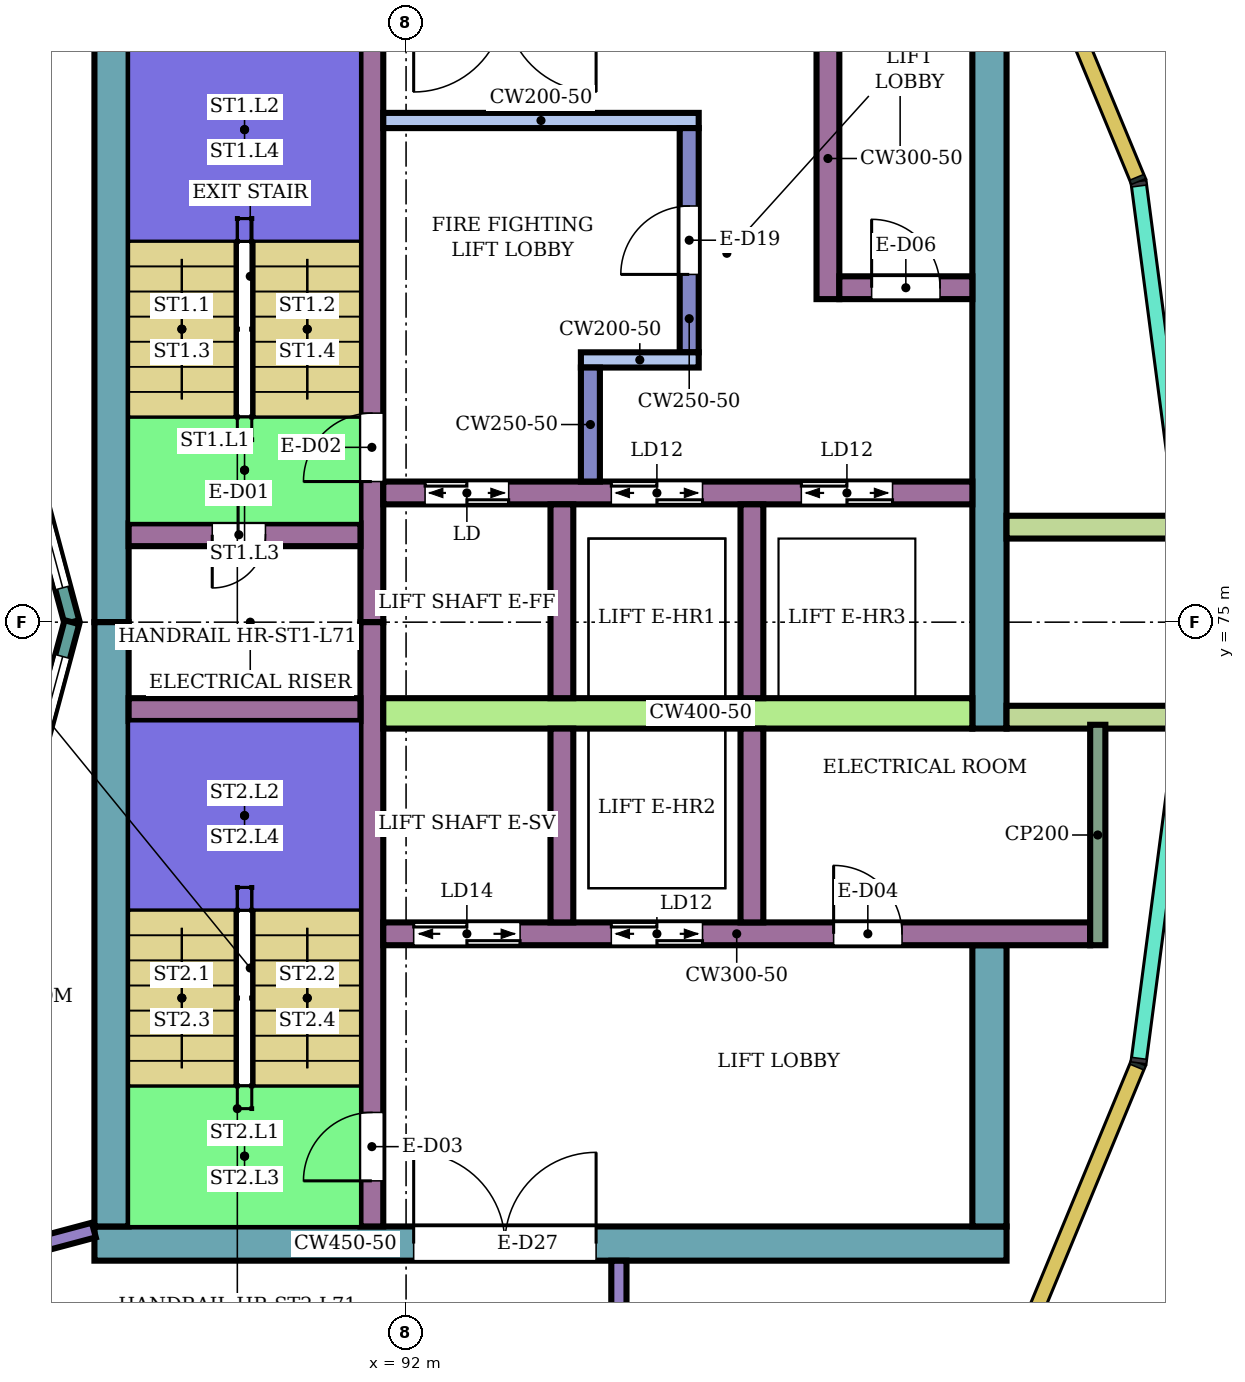
"""IFC4 building model, lengths in metres.
Left out: names, types, materials, properties, quantities, classifications, styles, units other than length and angle.
Written with IfcOpenShell. Run it as: python <this file> out.ifc"""

import sys

from ifc_helpers import new_model, si_unit, direction, frame, frame_2d, origin, place, context, subcontext, project, spatial, rectangle, extrude, element, fill, save


model = new_model("IFC4")
c1 = context("Model", 3, precision=1e-05, world=origin(), true_north=direction((0.0, 1.0)))
c2 = subcontext(c1, "Body", "Model", "MODEL_VIEW")
j1 = project(units=[si_unit("LENGTHUNIT", "METRE"), si_unit("PLANEANGLEUNIT", "RADIAN")], contexts=[c1])
p1 = place(None, origin())
s1 = spatial("IfcSite", under=j1, at=p1, CompositionType="ELEMENT")
p2 = place(p1, origin())
s2 = spatial("IfcBuilding", under=s1, at=p2, CompositionType="ELEMENT")
p3 = place(p2, frame((0.0, 0.0, 309.3)))
s3 = spatial("IfcBuildingStorey", under=s2, at=p3, CompositionType="ELEMENT", Elevation=309.3)
p4 = place(p3, frame((87.9, 66.825, 0.0), z_axis=(0.0, 0.0, 1.0), x_axis=(1.0, 0.0, 0.0)))
e1 = element("IfcWall", 1, at=p4, inside=s3, PredefinedType="SHEAR", context=c2, shape_type="SweptSolid", body=[
    extrude(rectangle(XDim=12.0, YDim=0.45, at=frame_2d((6.0, 0.0))), origin(), (0.0, 0.0, 1.0), 5.28),
])
p5 = place(p4, frame((4.2, 0.0, 0.0)))
e2 = element("IfcOpeningElement", 2, at=p5, cuts=e1, PredefinedType="OPENING", context=c2, shape_type="SweptSolid", body=[
    extrude(rectangle(XDim=2.4, YDim=2.4, at=frame_2d((1.2, 1.2))), frame((0.0, 0.235, 0.0), z_axis=(0.0, -1.0, 0.0), x_axis=(1.0, 0.0, 0.0)), (0.0, 0.0, 1.0), 0.47),
])
for number, where, z_axis, x_axis in (
    (3, (88.125, 75.0, 0.0), (0.0, 0.0, 1.0), (0.0, 1.0, 0.0)),
    (4, (88.125, 67.05, 0.0), (0.0, 0.0, 1.0), (0.0, 1.0, 0.0)),
):
    element("IfcWall", number, at=place(p3, frame(where, z_axis=z_axis, x_axis=x_axis)), inside=s3, PredefinedType="SHEAR", context=c2, shape_type="SweptSolid", body=[
        extrude(rectangle(XDim=7.95, YDim=0.45, at=frame_2d((3.975, 0.0))), origin(), (0.0, 0.0, 1.0), 5.28),
    ])
p6 = place(p3, frame((99.675, 73.6, 0.0), z_axis=(0.0, 0.0, 1.0), x_axis=(0.0, 1.0, 0.0)))
e5 = element("IfcWall", 5, at=p6, inside=s3, PredefinedType="SHEAR", context=c2, shape_type="SweptSolid", body=[
    extrude(rectangle(XDim=9.35, YDim=0.45, at=frame_2d((4.675, 0.0))), origin(), (0.0, 0.0, 1.0), 5.28),
])
p7 = place(p3, frame((99.675, 67.05, 0.0), z_axis=(0.0, 0.0, 1.0), x_axis=(0.0, 1.0, 0.0)))
e6 = element("IfcWall", 6, at=p7, inside=s3, PredefinedType="SHEAR", context=c2, shape_type="SweptSolid", body=[
    extrude(rectangle(XDim=3.7, YDim=0.45, at=frame_2d((1.85, 0.0))), origin(), (0.0, 0.0, 1.0), 5.28),
])
p8 = place(p3, frame((91.55, 75.0, 0.0), z_axis=(0.0, 0.0, 1.0), x_axis=(0.0, 1.0, 0.0)))
e7 = element("IfcWall", 7, at=p8, inside=s3, PredefinedType="SHEAR", context=c2, shape_type="SweptSolid", body=[
    extrude(rectangle(XDim=7.95, YDim=0.3, at=frame_2d((3.975, 0.0))), origin(), (0.0, 0.0, 1.0), 5.28),
])
p9 = place(p8, frame((1.85, 0.0, 0.0)))
e8 = element("IfcOpeningElement", 8, at=p9, cuts=e7, PredefinedType="OPENING", context=c2, shape_type="SweptSolid", body=[
    extrude(rectangle(XDim=0.9, YDim=2.1, at=frame_2d((0.45, 1.05))), frame((0.0, 0.16, 0.0), z_axis=(0.0, -1.0, 0.0), x_axis=(1.0, 0.0, 0.0)), (0.0, 0.0, 1.0), 0.32),
])
p10 = place(p3, frame((91.55, 67.05, 0.0), z_axis=(0.0, 0.0, 1.0), x_axis=(0.0, 1.0, 0.0)))
e9 = element("IfcWall", 9, at=p10, inside=s3, PredefinedType="SHEAR", context=c2, shape_type="SweptSolid", body=[
    extrude(rectangle(XDim=7.95, YDim=0.3, at=frame_2d((3.975, 0.0))), origin(), (0.0, 0.0, 1.0), 5.28),
])
p11 = place(p10, frame((0.6, 0.0, 0.0)))
e10 = element("IfcOpeningElement", 10, at=p11, cuts=e9, PredefinedType="OPENING", context=c2, shape_type="SweptSolid", body=[
    extrude(rectangle(XDim=0.9, YDim=2.1, at=frame_2d((0.45, 1.05))), frame((0.0, 0.16, 0.0), z_axis=(0.0, -1.0, 0.0), x_axis=(1.0, 0.0, 0.0)), (0.0, 0.0, 1.0), 0.32),
])
p12 = place(p3, frame((88.35, 76.15, 0.0), z_axis=(0.0, 0.0, 1.0), x_axis=(1.0, 0.0, 0.0)))
e11 = element("IfcWall", 11, at=p12, inside=s3, PredefinedType="SHEAR", context=c2, shape_type="SweptSolid", body=[
    extrude(rectangle(XDim=3.05, YDim=0.3, at=frame_2d((1.525, 0.0))), origin(), (0.0, 0.0, 1.0), 5.28),
])
p13 = place(p12, frame((1.1, 0.0, 0.0)))
e12 = element("IfcOpeningElement", 12, at=p13, cuts=e11, PredefinedType="OPENING", context=c2, shape_type="SweptSolid", body=[
    extrude(rectangle(XDim=0.7, YDim=2.0, at=frame_2d((0.35, 1.0))), frame((0.0, 0.16, 0.0), z_axis=(0.0, -1.0, 0.0), x_axis=(1.0, 0.0, 0.0)), (0.0, 0.0, 1.0), 0.32),
])
p14 = place(p3, frame((88.35, 73.85, 0.0), z_axis=(0.0, 0.0, 1.0), x_axis=(1.0, 0.0, 0.0)))
e13 = element("IfcWall", 13, at=p14, inside=s3, PredefinedType="SHEAR", context=c2, shape_type="SweptSolid", body=[
    extrude(rectangle(XDim=3.05, YDim=0.3, at=frame_2d((1.525, 0.0))), origin(), (0.0, 0.0, 1.0), 5.28),
])
p15 = place(p3, frame((91.7, 76.7, 0.0), z_axis=(0.0, 0.0, 1.0), x_axis=(1.0, 0.0, 0.0)))
e14 = element("IfcWall", 14, at=p15, inside=s3, PredefinedType="SHEAR", context=c2, shape_type="SweptSolid", body=[
    extrude(rectangle(XDim=7.75, YDim=0.3, at=frame_2d((3.875, 0.0))), origin(), (0.0, 0.0, 1.0), 5.28),
])
p16 = place(p15, frame((0.55, 0.0, 0.0)))
e15 = element("IfcOpeningElement", 15, at=p16, cuts=e14, PredefinedType="OPENING", context=c2, shape_type="SweptSolid", body=[
    extrude(rectangle(XDim=1.1, YDim=2.1, at=frame_2d((0.55, 1.05))), frame((0.0, 0.16, 0.0), z_axis=(0.0, -1.0, 0.0), x_axis=(1.0, 0.0, 0.0)), (0.0, 0.0, 1.0), 0.32),
])
p17 = place(p15, frame((3.0, 0.0, 0.0)))
e16 = element("IfcOpeningElement", 16, at=p17, cuts=e14, PredefinedType="OPENING", context=c2, shape_type="SweptSolid", body=[
    extrude(rectangle(XDim=1.2, YDim=2.1, at=frame_2d((0.6, 1.05))), frame((0.0, 0.16, 0.0), z_axis=(0.0, -1.0, 0.0), x_axis=(1.0, 0.0, 0.0)), (0.0, 0.0, 1.0), 0.32),
])
p18 = place(p15, frame((5.5, 0.0, 0.0)))
e17 = element("IfcOpeningElement", 17, at=p18, cuts=e14, PredefinedType="OPENING", context=c2, shape_type="SweptSolid", body=[
    extrude(rectangle(XDim=1.2, YDim=2.1, at=frame_2d((0.6, 1.05))), frame((0.0, 0.16, 0.0), z_axis=(0.0, -1.0, 0.0), x_axis=(1.0, 0.0, 0.0)), (0.0, 0.0, 1.0), 0.32),
])
p19 = place(p3, frame((91.7, 73.8, 0.0), z_axis=(0.0, 0.0, 1.0), x_axis=(1.0, 0.0, 0.0)))
e18 = element("IfcWall", 18, at=p19, inside=s3, PredefinedType="SHEAR", context=c2, shape_type="SweptSolid", body=[
    extrude(rectangle(XDim=7.75, YDim=0.4, at=frame_2d((3.875, 0.0))), origin(), (0.0, 0.0, 1.0), 5.28),
])
p20 = place(p3, frame((91.7, 70.9, 0.0), z_axis=(0.0, 0.0, 1.0), x_axis=(1.0, 0.0, 0.0)))
e19 = element("IfcWall", 19, at=p20, inside=s3, PredefinedType="SHEAR", context=c2, shape_type="SweptSolid", body=[
    extrude(rectangle(XDim=9.3, YDim=0.3, at=frame_2d((4.65, 0.0))), origin(), (0.0, 0.0, 1.0), 5.28),
])
p21 = place(p20, frame((0.4, 0.0, 0.0)))
e20 = element("IfcOpeningElement", 20, at=p21, cuts=e19, PredefinedType="OPENING", context=c2, shape_type="SweptSolid", body=[
    extrude(rectangle(XDim=1.4, YDim=2.1, at=frame_2d((0.7, 1.05))), frame((0.0, 0.16, 0.0), z_axis=(0.0, -1.0, 0.0), x_axis=(1.0, 0.0, 0.0)), (0.0, 0.0, 1.0), 0.32),
])
p22 = place(p20, frame((3.0, 0.0, 0.0)))
e21 = element("IfcOpeningElement", 21, at=p22, cuts=e19, PredefinedType="OPENING", context=c2, shape_type="SweptSolid", body=[
    extrude(rectangle(XDim=1.2, YDim=2.1, at=frame_2d((0.6, 1.05))), frame((0.0, 0.16, 0.0), z_axis=(0.0, -1.0, 0.0), x_axis=(1.0, 0.0, 0.0)), (0.0, 0.0, 1.0), 0.32),
])
p23 = place(p20, frame((5.925, 0.0, 0.0)))
e22 = element("IfcOpeningElement", 22, at=p23, cuts=e19, PredefinedType="OPENING", context=c2, shape_type="SweptSolid", body=[
    extrude(rectangle(XDim=0.9, YDim=2.1, at=frame_2d((0.45, 1.05))), frame((0.0, 0.16, 0.0), z_axis=(0.0, -1.0, 0.0), x_axis=(1.0, 0.0, 0.0)), (0.0, 0.0, 1.0), 0.32),
])
for number, where, z_axis, x_axis in (
    (23, (94.05, 74.0, 0.0), (0.0, 0.0, 1.0), (0.0, 1.0, 0.0)),
    (24, (96.55, 74.0, 0.0), (0.0, 0.0, 1.0), (0.0, 1.0, 0.0)),
    (25, (94.05, 71.05, 0.0), (0.0, 0.0, 1.0), (0.0, 1.0, 0.0)),
    (26, (96.55, 71.05, 0.0), (0.0, 0.0, 1.0), (0.0, 1.0, 0.0)),
):
    element("IfcWall", number, at=place(p3, frame(where, z_axis=z_axis, x_axis=x_axis)), inside=s3, PredefinedType="SHEAR", context=c2, shape_type="SweptSolid", body=[
        extrude(rectangle(XDim=2.55, YDim=0.3, at=frame_2d((1.275, 0.0))), origin(), (0.0, 0.0, 1.0), 5.28),
    ])
p24 = place(p3, frame((91.7, 81.6, 0.0), z_axis=(0.0, 0.0, 1.0), x_axis=(1.0, 0.0, 0.0)))
e27 = element("IfcWall", 27, at=p24, inside=s3, PredefinedType="SHEAR", context=c2, shape_type="SweptSolid", body=[
    extrude(rectangle(XDim=4.15, YDim=0.2, at=frame_2d((2.075, 0.0))), origin(), (0.0, 0.0, 1.0), 5.28),
])
p25 = place(p3, frame((95.725, 78.55, 0.0), z_axis=(0.0, 0.0, 1.0), x_axis=(0.0, 1.0, 0.0)))
e28 = element("IfcWall", 28, at=p25, inside=s3, PredefinedType="SHEAR", context=c2, shape_type="SweptSolid", body=[
    extrude(rectangle(XDim=2.95, YDim=0.25, at=frame_2d((1.475, 0.0))), origin(), (0.0, 0.0, 1.0), 5.28),
])
p26 = place(p25, frame((1.025, 0.0, 0.0)))
e29 = element("IfcOpeningElement", 29, at=p26, cuts=e28, PredefinedType="OPENING", context=c2, shape_type="SweptSolid", body=[
    extrude(rectangle(XDim=0.9, YDim=2.1, at=frame_2d((0.45, 1.05))), frame((0.0, 0.135, 0.0), z_axis=(0.0, -1.0, 0.0), x_axis=(1.0, 0.0, 0.0)), (0.0, 0.0, 1.0), 0.27),
])
p27 = place(p3, frame((94.3, 78.45, 0.0), z_axis=(0.0, 0.0, 1.0), x_axis=(1.0, 0.0, 0.0)))
e30 = element("IfcWall", 30, at=p27, inside=s3, PredefinedType="SHEAR", context=c2, shape_type="SweptSolid", body=[
    extrude(rectangle(XDim=1.55, YDim=0.2, at=frame_2d((0.775, 0.0))), origin(), (0.0, 0.0, 1.0), 5.28),
])
p28 = place(p3, frame((94.425, 76.85, 0.0), z_axis=(0.0, 0.0, 1.0), x_axis=(0.0, 1.0, 0.0)))
e31 = element("IfcWall", 31, at=p28, inside=s3, PredefinedType="SHEAR", context=c2, shape_type="SweptSolid", body=[
    extrude(rectangle(XDim=1.5, YDim=0.25, at=frame_2d((0.75, 0.0))), origin(), (0.0, 0.0, 1.0), 5.28),
])
p29 = place(p3, frame((97.55, 79.25, 0.0), z_axis=(0.0, 0.0, 1.0), x_axis=(0.0, 1.0, 0.0)))
e32 = element("IfcWall", 32, at=p29, inside=s3, PredefinedType="SHEAR", context=c2, shape_type="SweptSolid", body=[
    extrude(rectangle(XDim=3.7, YDim=0.3, at=frame_2d((1.85, 0.0))), origin(), (0.0, 0.0, 1.0), 5.28),
])
p30 = place(p3, frame((97.7, 79.4, 0.0), z_axis=(0.0, 0.0, 1.0), x_axis=(1.0, 0.0, 0.0)))
e33 = element("IfcWall", 33, at=p30, inside=s3, PredefinedType="SHEAR", context=c2, shape_type="SweptSolid", body=[
    extrude(rectangle(XDim=1.75, YDim=0.3, at=frame_2d((0.875, 0.0))), origin(), (0.0, 0.0, 1.0), 5.28),
])
p31 = place(p30, frame((0.425, 0.0, 0.0)))
e34 = element("IfcOpeningElement", 34, at=p31, cuts=e33, PredefinedType="OPENING", context=c2, shape_type="SweptSolid", body=[
    extrude(rectangle(XDim=0.9, YDim=2.1, at=frame_2d((0.45, 1.05))), frame((0.0, 0.16, 0.0), z_axis=(0.0, -1.0, 0.0), x_axis=(1.0, 0.0, 0.0)), (0.0, 0.0, 1.0), 0.32),
])
for number, where, z_axis, x_axis in (
    (35, (99.9, 73.75, 0.0), (0.0, 0.0, 1.0), (1.0, 0.0, 0.0)),
    (36, (99.9, 76.25, 0.0), (0.0, 0.0, 1.0), (1.0, 0.0, 0.0)),
):
    element("IfcWall", number, at=place(p3, frame(where, z_axis=z_axis, x_axis=x_axis)), inside=s3, PredefinedType="NOTDEFINED", context=c2, shape_type="SweptSolid", body=[
        extrude(rectangle(XDim=2.416, YDim=0.3, at=frame_2d((1.208, 0.0))), origin(), (0.0, 0.0, 1.0), 5.6),
    ])
p32 = place(p3, frame((87.604, 75.0, 0.0), z_axis=(0.0, 0.0, 1.0), x_axis=(-0.258789828301, 0.965933654434, 0.0)))
e37 = element("IfcWall", 37, at=p32, inside=s3, PredefinedType="NOTDEFINED", context=c2, shape_type="SweptSolid", body=[
    extrude(rectangle(XDim=3.936, YDim=0.2, at=frame_2d((1.968, 0.0))), origin(), (0.0, 0.0, 1.0), 5.6),
])
p33 = place(p32, frame((0.468, 0.0, 0.9)))
e38 = element("IfcOpeningElement", 38, at=p33, cuts=e37, PredefinedType="OPENING", context=c2, shape_type="SweptSolid", body=[
    extrude(rectangle(XDim=3.0, YDim=2.3, at=frame_2d((1.5, 1.15))), frame((0.0, 0.11, 0.0), z_axis=(0.0, -1.0, 0.0), x_axis=(1.0, 0.0, 0.0)), (0.0, 0.0, 1.0), 0.22),
])
p34 = place(p3, frame((86.585, 71.198, 0.0), z_axis=(0.0, 0.0, 1.0), x_axis=(0.258789828301, 0.965933654434, 0.0)))
e39 = element("IfcWall", 39, at=p34, inside=s3, PredefinedType="NOTDEFINED", context=c2, shape_type="SweptSolid", body=[
    extrude(rectangle(XDim=3.936, YDim=0.2, at=frame_2d((1.968, 0.0))), origin(), (0.0, 0.0, 1.0), 5.6),
])
p35 = place(p34, frame((0.468, 0.0, 0.9)))
e40 = element("IfcOpeningElement", 40, at=p35, cuts=e39, PredefinedType="OPENING", context=c2, shape_type="SweptSolid", body=[
    extrude(rectangle(XDim=3.0, YDim=2.3, at=frame_2d((1.5, 1.15))), frame((0.0, 0.11, 0.0), z_axis=(0.0, -1.0, 0.0), x_axis=(1.0, 0.0, 0.0)), (0.0, 0.0, 1.0), 0.22),
])
p36 = place(p3, frame((80.125, 64.932, 0.0), z_axis=(0.0, 0.0, 1.0), x_axis=(0.966236955806, 0.257655089674, 0.0)))
e41 = element("IfcWall", 41, at=p36, inside=s3, PredefinedType="PARTITIONING", context=c2, shape_type="SweptSolid", body=[
    extrude(rectangle(XDim=8.039, YDim=0.2, at=frame_2d((4.02, 0.0))), origin(), (0.0, 0.0, 1.0), 5.15),
])
p37 = place(p36, frame((6.148, 0.0, 0.0)))
e42 = element("IfcOpeningElement", 42, at=p37, cuts=e41, PredefinedType="OPENING", context=c2, shape_type="SweptSolid", body=[
    extrude(rectangle(XDim=1.2, YDim=2.4, at=frame_2d((0.6, 1.2))), frame((0.0, 0.11, 0.0), z_axis=(0.0, -1.0, 0.0), x_axis=(1.0, 0.0, 0.0)), (0.0, 0.0, 1.0), 0.22),
])
p38 = place(p36, frame((1.895, 0.0, 0.0)))
e43 = element("IfcOpeningElement", 43, at=p38, cuts=e41, PredefinedType="OPENING", context=c2, shape_type="SweptSolid", body=[
    extrude(rectangle(XDim=1.2, YDim=2.4, at=frame_2d((0.6, 1.2))), frame((0.0, 0.11, 0.0), z_axis=(0.0, -1.0, 0.0), x_axis=(1.0, 0.0, 0.0)), (0.0, 0.0, 1.0), 0.22),
])
p39 = place(p3, frame((94.8, 65.1, 0.0), z_axis=(0.0, 0.0, 1.0), x_axis=(0.0, 1.0, 0.0)))
e44 = element("IfcWall", 44, at=p39, inside=s3, PredefinedType="PARTITIONING", context=c2, shape_type="SweptSolid", body=[
    extrude(rectangle(XDim=1.499, YDim=0.2, at=frame_2d((0.75, 0.0))), origin(), (0.0, 0.0, 1.0), 5.15),
])
p40 = place(p3, frame((101.1, 70.75, 0.0), z_axis=(0.0, 0.0, 1.0), x_axis=(0.0, 1.0, 0.0)))
e45 = element("IfcWall", 45, at=p40, inside=s3, PredefinedType="PARTITIONING", context=c2, shape_type="SweptSolid", body=[
    extrude(rectangle(XDim=2.9, YDim=0.2, at=frame_2d((1.45, 0.0))), origin(), (0.0, 0.0, 1.0), 5.28),
])
p41 = place(p33, origin())
e46 = element("IfcWindow", 46, at=p41, inside=s3, PartitioningType="SINGLE_PANEL", PredefinedType="WINDOW", context=c2, shape_type="SweptSolid", body=[
    extrude(rectangle(XDim=3.0, YDim=2.3, at=frame_2d((1.5, 1.15))), frame((0.0, 0.03, 0.0), z_axis=(0.0, -1.0, 0.0), x_axis=(1.0, 0.0, 0.0)), (0.0, 0.0, 1.0), 0.06),
])
fill(e38, e46)
p42 = place(p35, origin())
e47 = element("IfcWindow", 47, at=p42, inside=s3, PartitioningType="SINGLE_PANEL", PredefinedType="WINDOW", context=c2, shape_type="SweptSolid", body=[
    extrude(rectangle(XDim=3.0, YDim=2.3, at=frame_2d((1.5, 1.15))), frame((0.0, 0.03, 0.0), z_axis=(0.0, -1.0, 0.0), x_axis=(1.0, 0.0, 0.0)), (0.0, 0.0, 1.0), 0.06),
])
fill(e40, e47)
p43 = place(p13, frame((0.7, 0.0, 0.0), z_axis=(0.0, 0.0, 1.0), x_axis=(-1.0, 0.0, 0.0)))
e48 = element("IfcDoor", 48, at=p43, inside=s3, OperationType="SINGLE_SWING_RIGHT", PredefinedType="DOOR", context=c2, shape_type="SweptSolid", body=[
    extrude(rectangle(XDim=0.7, YDim=2.0, at=frame_2d((0.35, 1.0))), frame((0.0, 0.025, 0.0), z_axis=(0.0, -1.0, 0.0), x_axis=(1.0, 0.0, 0.0)), (0.0, 0.0, 1.0), 0.05),
])
fill(e12, e48)
p44 = place(p9, origin())
e49 = element("IfcDoor", 49, at=p44, inside=s3, OperationType="SINGLE_SWING_LEFT", PredefinedType="DOOR", context=c2, shape_type="SweptSolid", body=[
    extrude(rectangle(XDim=0.9, YDim=2.1, at=frame_2d((0.45, 1.05))), frame((0.0, 0.025, 0.0), z_axis=(0.0, -1.0, 0.0), x_axis=(1.0, 0.0, 0.0)), (0.0, 0.0, 1.0), 0.05),
])
fill(e8, e49)
p45 = place(p11, origin())
e50 = element("IfcDoor", 50, at=p45, inside=s3, OperationType="SINGLE_SWING_LEFT", PredefinedType="DOOR", context=c2, shape_type="SweptSolid", body=[
    extrude(rectangle(XDim=0.9, YDim=2.1, at=frame_2d((0.45, 1.05))), frame((0.0, 0.025, 0.0), z_axis=(0.0, -1.0, 0.0), x_axis=(1.0, 0.0, 0.0)), (0.0, 0.0, 1.0), 0.05),
])
fill(e10, e50)
p46 = place(p16, origin())
e51 = element("IfcDoor", 51, at=p46, inside=s3, OperationType="DOUBLE_DOOR_SLIDING", PredefinedType="DOOR", context=c2, shape_type="SweptSolid", body=[
    extrude(rectangle(XDim=1.1, YDim=2.1, at=frame_2d((0.55, 1.05))), frame((0.0, 0.025, 0.0), z_axis=(0.0, -1.0, 0.0), x_axis=(1.0, 0.0, 0.0)), (0.0, 0.0, 1.0), 0.05),
])
fill(e15, e51)
p47 = place(p17, origin())
e52 = element("IfcDoor", 52, at=p47, inside=s3, OperationType="DOUBLE_DOOR_SLIDING", PredefinedType="DOOR", context=c2, shape_type="SweptSolid", body=[
    extrude(rectangle(XDim=1.2, YDim=2.1, at=frame_2d((0.6, 1.05))), frame((0.0, 0.025, 0.0), z_axis=(0.0, -1.0, 0.0), x_axis=(1.0, 0.0, 0.0)), (0.0, 0.0, 1.0), 0.05),
])
fill(e16, e52)
p48 = place(p18, origin())
e53 = element("IfcDoor", 53, at=p48, inside=s3, OperationType="DOUBLE_DOOR_SLIDING", PredefinedType="DOOR", context=c2, shape_type="SweptSolid", body=[
    extrude(rectangle(XDim=1.2, YDim=2.1, at=frame_2d((0.6, 1.05))), frame((0.0, 0.025, 0.0), z_axis=(0.0, -1.0, 0.0), x_axis=(1.0, 0.0, 0.0)), (0.0, 0.0, 1.0), 0.05),
])
fill(e17, e53)
p49 = place(p21, origin())
e54 = element("IfcDoor", 54, at=p49, inside=s3, OperationType="DOUBLE_DOOR_SLIDING", PredefinedType="DOOR", context=c2, shape_type="SweptSolid", body=[
    extrude(rectangle(XDim=1.4, YDim=2.1, at=frame_2d((0.7, 1.05))), frame((0.0, 0.025, 0.0), z_axis=(0.0, -1.0, 0.0), x_axis=(1.0, 0.0, 0.0)), (0.0, 0.0, 1.0), 0.05),
])
fill(e20, e54)
p50 = place(p22, origin())
e55 = element("IfcDoor", 55, at=p50, inside=s3, OperationType="DOUBLE_DOOR_SLIDING", PredefinedType="DOOR", context=c2, shape_type="SweptSolid", body=[
    extrude(rectangle(XDim=1.2, YDim=2.1, at=frame_2d((0.6, 1.05))), frame((0.0, 0.025, 0.0), z_axis=(0.0, -1.0, 0.0), x_axis=(1.0, 0.0, 0.0)), (0.0, 0.0, 1.0), 0.05),
])
fill(e21, e55)
p51 = place(p23, origin())
e56 = element("IfcDoor", 56, at=p51, inside=s3, OperationType="SINGLE_SWING_LEFT", PredefinedType="DOOR", context=c2, shape_type="SweptSolid", body=[
    extrude(rectangle(XDim=0.9, YDim=2.1, at=frame_2d((0.45, 1.05))), frame((0.0, 0.025, 0.0), z_axis=(0.0, -1.0, 0.0), x_axis=(1.0, 0.0, 0.0)), (0.0, 0.0, 1.0), 0.05),
])
fill(e22, e56)
p52 = place(p26, origin())
e57 = element("IfcDoor", 57, at=p52, inside=s3, OperationType="SINGLE_SWING_LEFT", PredefinedType="DOOR", context=c2, shape_type="SweptSolid", body=[
    extrude(rectangle(XDim=0.9, YDim=2.1, at=frame_2d((0.45, 1.05))), frame((0.0, 0.025, 0.0), z_axis=(0.0, -1.0, 0.0), x_axis=(1.0, 0.0, 0.0)), (0.0, 0.0, 1.0), 0.05),
])
fill(e29, e57)
p53 = place(p31, origin())
e58 = element("IfcDoor", 58, at=p53, inside=s3, OperationType="SINGLE_SWING_LEFT", PredefinedType="DOOR", context=c2, shape_type="SweptSolid", body=[
    extrude(rectangle(XDim=0.9, YDim=2.1, at=frame_2d((0.45, 1.05))), frame((0.0, 0.025, 0.0), z_axis=(0.0, -1.0, 0.0), x_axis=(1.0, 0.0, 0.0)), (0.0, 0.0, 1.0), 0.05),
])
fill(e34, e58)
p54 = place(p5, origin())
e59 = element("IfcDoor", 59, at=p54, inside=s3, OperationType="DOUBLE_DOOR_SINGLE_SWING", PredefinedType="DOOR", context=c2, shape_type="SweptSolid", body=[
    extrude(rectangle(XDim=2.4, YDim=2.4, at=frame_2d((1.2, 1.2))), frame((0.0, 0.025, 0.0), z_axis=(0.0, -1.0, 0.0), x_axis=(1.0, 0.0, 0.0)), (0.0, 0.0, 1.0), 0.05),
])
fill(e2, e59)
save(model, sys.argv[1])
